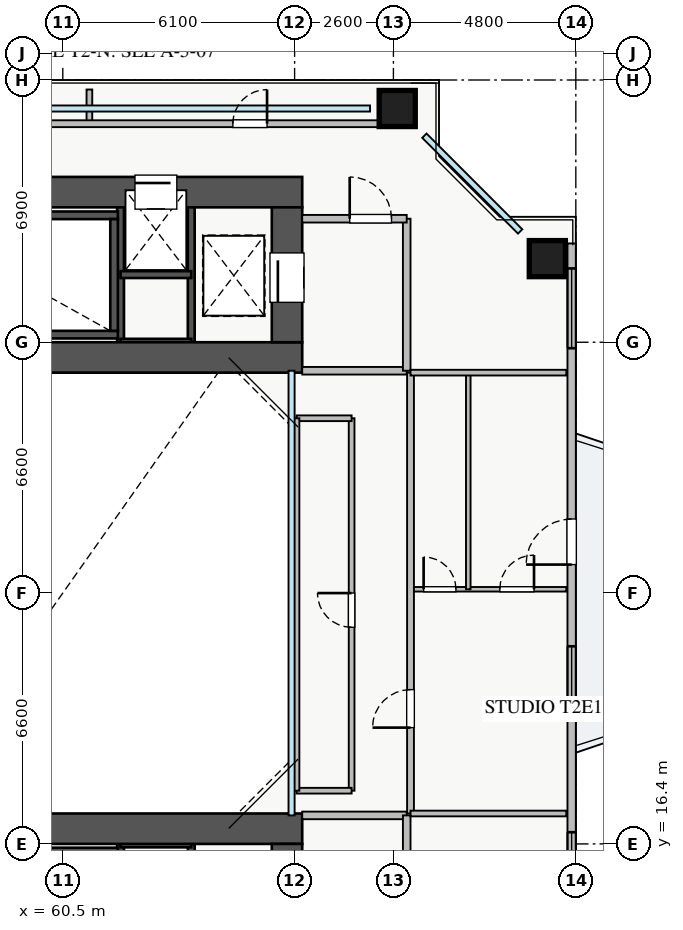
"""IFC4 building model, lengths in metres.
Left out: names, types, materials, properties, quantities, classifications, styles, units other than length and angle.
Written with IfcOpenShell. Run it as: python <this file> out.ifc"""

import sys

from ifc_helpers import new_model, si_unit, direction, frame, frame_2d, origin, origin_2d, place, context, subcontext, project, spatial, rectangle, extrude, source, transform, mapped, element, fill, save


model = new_model("IFC4")
c1 = context("Model", 3, precision=1e-05, world=origin(), true_north=direction((0.0, 1.0)))
c2 = subcontext(c1, "Body", "Model", "MODEL_VIEW")
j1 = project(units=[si_unit("LENGTHUNIT", "METRE"), si_unit("PLANEANGLEUNIT", "RADIAN")], contexts=[c1])
p1 = place(None, origin())
s1 = spatial("IfcSite", under=j1, at=p1, CompositionType="ELEMENT")
p2 = place(p1, origin())
s2 = spatial("IfcBuilding", under=s1, at=p2, CompositionType="ELEMENT")
p3 = place(p2, frame((0.0, 0.0, 36.0)))
s3 = spatial("IfcBuildingStorey", under=s2, at=p3, CompositionType="ELEMENT", Elevation=36.0)
for number, where, z_axis, x_axis in (
    (1, (62.02, 29.6, 0.0), (0.0, 0.0, 1.0), (0.0, 1.0, 0.0)),
    (2, (63.88, 29.6, 0.0), (0.0, 0.0, 1.0), (0.0, 1.0, 0.0)),
):
    element("IfcWall", number, at=place(p3, frame(where, z_axis=z_axis, x_axis=x_axis)), inside=s3, PredefinedType="SHEAR", context=c2, shape_type="SweptSolid", body=[
        extrude(rectangle(XDim=3.95, YDim=0.18, at=frame_2d((1.975, 0.0))), origin(), (0.0, 0.0, 1.0), 3.07),
    ])
for number, where, z_axis, x_axis in (
    (3, (62.02, 31.38, 0.0), (0.0, 0.0, 1.0), (1.0, 0.0, 0.0)),
    (4, (62.02, 29.6, 0.0), (0.0, 0.0, 1.0), (1.0, 0.0, 0.0)),
):
    element("IfcWall", number, at=place(p3, frame(where, z_axis=z_axis, x_axis=x_axis)), inside=s3, PredefinedType="SHEAR", context=c2, shape_type="SweptSolid", body=[
        extrude(rectangle(XDim=1.86, YDim=0.18, at=frame_2d((0.93, 0.0))), origin(), (0.0, 0.0, 1.0), 3.07),
    ])
for number, where, z_axis, x_axis in (
    (5, (62.02, 12.45, 0.0), (0.0, 0.0, 1.0), (0.0, 1.0, 0.0)),
    (6, (63.88, 12.45, 0.0), (0.0, 0.0, 1.0), (0.0, 1.0, 0.0)),
):
    element("IfcWall", number, at=place(p3, frame(where, z_axis=z_axis, x_axis=x_axis)), inside=s3, PredefinedType="SHEAR", context=c2, shape_type="SweptSolid", body=[
        extrude(rectangle(XDim=3.95, YDim=0.18, at=frame_2d((1.975, 0.0))), origin(), (0.0, 0.0, 1.0), 3.07),
    ])
p4 = place(p3, frame((62.02, 16.4, 0.0), z_axis=(0.0, 0.0, 1.0), x_axis=(1.0, 0.0, 0.0)))
e7 = element("IfcWall", 7, at=p4, inside=s3, PredefinedType="SHEAR", context=c2, shape_type="SweptSolid", body=[
    extrude(rectangle(XDim=1.86, YDim=0.18, at=frame_2d((0.93, 0.0))), origin(), (0.0, 0.0, 1.0), 3.07),
])
for number, where, z_axis, x_axis in (
    (8, (54.8, 29.8, 0.0), (0.0, 0.0, 1.0), (1.0, 0.0, 0.0)),
    (9, (54.8, 32.94, 0.0), (0.0, 0.0, 1.0), (1.0, 0.0, 0.0)),
):
    element("IfcWall", number, at=place(p3, frame(where, z_axis=z_axis, x_axis=x_axis)), inside=s3, PredefinedType="SHEAR", context=c2, shape_type="SweptSolid", body=[
        extrude(rectangle(XDim=7.15, YDim=0.2, at=frame_2d((3.575, 0.0))), origin(), (0.0, 0.0, 1.0), 3.25),
    ])
p5 = place(p3, frame((61.85, 29.9, 0.0), z_axis=(0.0, 0.0, 1.0), x_axis=(0.0, 1.0, 0.0)))
e10 = element("IfcWall", 10, at=p5, inside=s3, PredefinedType="SHEAR", context=c2, shape_type="SweptSolid", body=[
    extrude(rectangle(XDim=2.94, YDim=0.2, at=frame_2d((1.47, 0.0))), origin(), (0.0, 0.0, 1.0), 3.25),
])
p6 = place(p3, frame((54.8, 16.2, 0.0), z_axis=(0.0, 0.0, 1.0), x_axis=(1.0, 0.0, 0.0)))
e11 = element("IfcWall", 11, at=p6, inside=s3, PredefinedType="SHEAR", context=c2, shape_type="SweptSolid", body=[
    extrude(rectangle(XDim=7.15, YDim=0.2, at=frame_2d((3.575, 0.0))), origin(), (0.0, 0.0, 1.0), 3.25),
])
p7 = place(p3, frame((54.2, 29.2, 0.0), z_axis=(0.0, 0.0, 1.0), x_axis=(1.0, 0.0, 0.0)))
e12 = element("IfcWall", 12, at=p7, inside=s3, PredefinedType="SHEAR", context=c2, shape_type="SweptSolid", body=[
    extrude(rectangle(XDim=12.6, YDim=0.8, at=frame_2d((6.3, 0.0))), origin(), (0.0, 0.0, 1.0), 3.25),
])
p8 = place(p3, frame((54.2, 33.55, 0.0), z_axis=(0.0, 0.0, 1.0), x_axis=(1.0, 0.0, 0.0)))
e13 = element("IfcWall", 13, at=p8, inside=s3, PredefinedType="SHEAR", context=c2, shape_type="SweptSolid", body=[
    extrude(rectangle(XDim=12.6, YDim=0.8, at=frame_2d((6.3, 0.0))), origin(), (0.0, 0.0, 1.0), 3.25),
])
p9 = place(p8, frame((8.2, 0.0, 0.0)))
e14 = element("IfcOpeningElement", 14, at=p9, cuts=e13, PredefinedType="OPENING", context=c2, shape_type="SweptSolid", body=[
    extrude(rectangle(XDim=1.1, YDim=2.05, at=frame_2d((0.55, 1.025))), frame((0.0, 0.41, 0.0), z_axis=(0.0, -1.0, 0.0), x_axis=(1.0, 0.0, 0.0)), (0.0, 0.0, 1.0), 0.82),
])
p10 = place(p3, frame((66.4, 29.6, 0.0), z_axis=(0.0, 0.0, 1.0), x_axis=(0.0, 1.0, 0.0)))
e15 = element("IfcWall", 15, at=p10, inside=s3, PredefinedType="SHEAR", context=c2, shape_type="SweptSolid", body=[
    extrude(rectangle(XDim=3.55, YDim=0.8, at=frame_2d((1.775, 0.0))), origin(), (0.0, 0.0, 1.0), 3.25),
])
p11 = place(p10, frame((1.05, 0.0, 0.0)))
e16 = element("IfcOpeningElement", 16, at=p11, cuts=e15, PredefinedType="OPENING", context=c2, shape_type="SweptSolid", body=[
    extrude(rectangle(XDim=1.3, YDim=2.05, at=frame_2d((0.65, 1.025))), frame((0.0, 0.41, 0.0), z_axis=(0.0, -1.0, 0.0), x_axis=(1.0, 0.0, 0.0)), (0.0, 0.0, 1.0), 0.82),
])
p12 = place(p3, frame((54.2, 16.8, 0.0), z_axis=(0.0, 0.0, 1.0), x_axis=(1.0, 0.0, 0.0)))
e17 = element("IfcWall", 17, at=p12, inside=s3, PredefinedType="SHEAR", context=c2, shape_type="SweptSolid", body=[
    extrude(rectangle(XDim=12.6, YDim=0.8, at=frame_2d((6.3, 0.0))), origin(), (0.0, 0.0, 1.0), 3.25),
])
p13 = place(p3, frame((66.4, 12.85, 0.0), z_axis=(0.0, 0.0, 1.0), x_axis=(0.0, 1.0, 0.0)))
e18 = element("IfcWall", 18, at=p13, inside=s3, PredefinedType="SHEAR", context=c2, shape_type="SweptSolid", body=[
    extrude(rectangle(XDim=3.55, YDim=0.8, at=frame_2d((1.775, 0.0))), origin(), (0.0, 0.0, 1.0), 3.25),
])
p14 = place(p13, frame((1.05, 0.0, 0.0)))
e19 = element("IfcOpeningElement", 19, at=p14, cuts=e18, PredefinedType="OPENING", context=c2, shape_type="SweptSolid", body=[
    extrude(rectangle(XDim=1.3, YDim=2.05, at=frame_2d((0.65, 1.025))), frame((0.0, 0.41, 0.0), z_axis=(0.0, -1.0, 0.0), x_axis=(1.0, 0.0, 0.0)), (0.0, 0.0, 1.0), 0.82),
])
m1 = source(origin(), c2, "Body", "SweptSolid", [
    extrude(rectangle(XDim=0.95, YDim=0.95, at=origin_2d()), origin(), (0.0, 0.0, 1.0), 3.25),
])
for number, where, z_axis, x_axis in (
    (20, (73.25, 31.8, 0.0), (0.0, 0.0, 1.0), (1.0, 0.0, 0.0)),
    (21, (69.3, 35.75, 0.0), (0.0, 0.0, 1.0), (1.0, 0.0, 0.0)),
):
    element("IfcColumn", number, at=place(p3, frame(where, z_axis=z_axis, x_axis=x_axis)), inside=s3, PredefinedType="COLUMN", context=c2, shape_type="MappedRepresentation", body=[
        mapped(m1, transform((0.0, 0.0, 0.0), x_axis=(1.0, 0.0, 0.0), y_axis=(0.0, 1.0, 0.0), z_axis=(0.0, 0.0, 1.0), scale=1.0)),
    ])
p15 = place(p3, frame((73.89, 13.8, 0.0), z_axis=(0.0, 0.0, 1.0), x_axis=(0.0, 1.0, 0.0)))
e22 = element("IfcWall", 22, at=p15, inside=s3, PredefinedType="STANDARD", context=c2, shape_type="SweptSolid", body=[
    extrude(rectangle(XDim=18.4, YDim=0.22, at=frame_2d((9.2, 0.0))), origin(), (0.0, 0.0, 1.0), 2.61),
])
p16 = place(p15, frame((9.95, 0.0, 0.0)))
e23 = element("IfcOpeningElement", 23, at=p16, cuts=e22, PredefinedType="OPENING", context=c2, shape_type="SweptSolid", body=[
    extrude(rectangle(XDim=1.2, YDim=2.1, at=frame_2d((0.6, 1.05))), frame((0.0, 0.12, 0.0), z_axis=(0.0, -1.0, 0.0), x_axis=(1.0, 0.0, 0.0)), (0.0, 0.0, 1.0), 0.24),
])
p17 = place(p15, frame((0.508, 0.0, 0.9)))
e24 = element("IfcOpeningElement", 24, at=p17, cuts=e22, PredefinedType="OPENING", context=c2, shape_type="SweptSolid", body=[
    extrude(rectangle(XDim=2.4, YDim=1.5, at=frame_2d((1.2, 0.75))), frame((0.0, 0.12, 0.0), z_axis=(0.0, -1.0, 0.0), x_axis=(1.0, 0.0, 0.0)), (0.0, 0.0, 1.0), 0.24),
])
p18 = place(p15, frame((6.0, 0.0, 0.9)))
e25 = element("IfcOpeningElement", 25, at=p18, cuts=e22, PredefinedType="OPENING", context=c2, shape_type="SweptSolid", body=[
    extrude(rectangle(XDim=1.8, YDim=1.45, at=frame_2d((0.9, 0.725))), frame((0.0, 0.12, 0.0), z_axis=(0.0, -1.0, 0.0), x_axis=(1.0, 0.0, 0.0)), (0.0, 0.0, 1.0), 0.24),
])
p19 = place(p15, frame((15.643, 0.0, 0.9)))
e26 = element("IfcOpeningElement", 26, at=p19, cuts=e22, PredefinedType="OPENING", context=c2, shape_type="SweptSolid", body=[
    extrude(rectangle(XDim=2.1, YDim=1.5, at=frame_2d((1.05, 0.75))), frame((0.0, 0.12, 0.0), z_axis=(0.0, -1.0, 0.0), x_axis=(1.0, 0.0, 0.0)), (0.0, 0.0, 1.0), 0.24),
])
p20 = place(p3, frame((66.8, 28.85, 0.0), z_axis=(0.0, 0.0, 1.0), x_axis=(1.0, 0.0, 0.0)))
e27 = element("IfcWall", 27, at=p20, inside=s3, PredefinedType="PARTITIONING", context=c2, shape_type="SweptSolid", body=[
    extrude(rectangle(XDim=2.75, YDim=0.2, at=frame_2d((1.375, 0.0))), origin(), (0.0, 0.0, 1.0), 3.07),
])
p21 = place(p3, frame((69.55, 28.85, 0.0), z_axis=(0.0, 0.0, 1.0), x_axis=(0.0, 1.0, 0.0)))
e28 = element("IfcWall", 28, at=p21, inside=s3, PredefinedType="PARTITIONING", context=c2, shape_type="SweptSolid", body=[
    extrude(rectangle(XDim=4.0, YDim=0.2, at=frame_2d((2.0, 0.0))), origin(), (0.0, 0.0, 1.0), 2.615),
])
p22 = place(p3, frame((66.8, 32.85, 0.0), z_axis=(0.0, 0.0, 1.0), x_axis=(1.0, 0.0, 0.0)))
e29 = element("IfcWall", 29, at=p22, inside=s3, PredefinedType="PARTITIONING", context=c2, shape_type="SweptSolid", body=[
    extrude(rectangle(XDim=2.75, YDim=0.2, at=frame_2d((1.375, 0.0))), origin(), (0.0, 0.0, 1.0), 3.07),
])
p23 = place(p22, frame((1.25, 0.0, 0.0)))
e30 = element("IfcOpeningElement", 30, at=p23, cuts=e29, PredefinedType="OPENING", context=c2, shape_type="SweptSolid", body=[
    extrude(rectangle(XDim=1.1, YDim=2.05, at=frame_2d((0.55, 1.025))), frame((0.0, 0.11, 0.0), z_axis=(0.0, -1.0, 0.0), x_axis=(1.0, 0.0, 0.0)), (0.0, 0.0, 1.0), 0.22),
])
p24 = place(p3, frame((66.8, 17.15, 0.0), z_axis=(0.0, 0.0, 1.0), x_axis=(1.0, 0.0, 0.0)))
e31 = element("IfcWall", 31, at=p24, inside=s3, PredefinedType="PARTITIONING", context=c2, shape_type="SweptSolid", body=[
    extrude(rectangle(XDim=2.75, YDim=0.2, at=frame_2d((1.375, 0.0))), origin(), (0.0, 0.0, 1.0), 3.07),
])
p25 = place(p3, frame((69.55, 13.15, 0.0), z_axis=(0.0, 0.0, 1.0), x_axis=(0.0, 1.0, 0.0)))
e32 = element("IfcWall", 32, at=p25, inside=s3, PredefinedType="PARTITIONING", context=c2, shape_type="SweptSolid", body=[
    extrude(rectangle(XDim=4.0, YDim=0.2, at=frame_2d((2.0, 0.0))), origin(), (0.0, 0.0, 1.0), 2.615),
])
p26 = place(p3, frame((69.65, 23.1, 0.0), z_axis=(0.0, 0.0, 1.0), x_axis=(1.0, 0.0, 0.0)))
e33 = element("IfcWall", 33, at=p26, inside=s3, PredefinedType="PLUMBINGWALL", context=c2, shape_type="SweptSolid", body=[
    extrude(rectangle(XDim=4.1, YDim=0.12, at=frame_2d((2.05, 0.0))), origin(), (0.0, 0.0, 1.0), 2.715),
])
p27 = place(p26, frame((0.345, 0.0, 0.0)))
e34 = element("IfcOpeningElement", 34, at=p27, cuts=e33, PredefinedType="OPENING", context=c2, shape_type="SweptSolid", body=[
    extrude(rectangle(XDim=0.85, YDim=2.05, at=frame_2d((0.425, 1.025))), frame((0.0, 0.07, 0.0), z_axis=(0.0, -1.0, 0.0), x_axis=(1.0, 0.0, 0.0)), (0.0, 0.0, 1.0), 0.14),
])
p28 = place(p26, frame((2.35, 0.0, 0.0)))
e35 = element("IfcOpeningElement", 35, at=p28, cuts=e33, PredefinedType="OPENING", context=c2, shape_type="SweptSolid", body=[
    extrude(rectangle(XDim=0.9, YDim=2.05, at=frame_2d((0.45, 1.025))), frame((0.0, 0.07, 0.0), z_axis=(0.0, -1.0, 0.0), x_axis=(1.0, 0.0, 0.0)), (0.0, 0.0, 1.0), 0.14),
])
p29 = place(p3, frame((71.17, 23.1, 0.0), z_axis=(0.0, 0.0, 1.0), x_axis=(0.0, 1.0, 0.0)))
e36 = element("IfcWall", 36, at=p29, inside=s3, PredefinedType="PLUMBINGWALL", context=c2, shape_type="SweptSolid", body=[
    extrude(rectangle(XDim=5.7, YDim=0.12, at=frame_2d((2.85, 0.0))), origin(), (0.0, 0.0, 1.0), 3.07),
])
p30 = place(p3, frame((69.65, 17.2, 0.0), z_axis=(0.0, 0.0, 1.0), x_axis=(0.0, 1.0, 0.0)))
e37 = element("IfcWall", 37, at=p30, inside=s3, PredefinedType="PARTITIONING", context=c2, shape_type="SweptSolid", body=[
    extrude(rectangle(XDim=11.6, YDim=0.18, at=frame_2d((5.8, 0.0))), origin(), (0.0, 0.0, 1.0), 3.07),
])
p31 = place(p30, frame((2.26, 0.0, 0.0)))
e38 = element("IfcOpeningElement", 38, at=p31, cuts=e37, PredefinedType="OPENING", context=c2, shape_type="SweptSolid", body=[
    extrude(rectangle(XDim=1.0, YDim=2.05, at=frame_2d((0.5, 1.025))), frame((0.0, 0.1, 0.0), z_axis=(0.0, -1.0, 0.0), x_axis=(1.0, 0.0, 0.0)), (0.0, 0.0, 1.0), 0.2),
])
for number, where, z_axis, x_axis in (
    (39, (69.65, 17.2, 0.0), (0.0, 0.0, 1.0), (1.0, 0.0, 0.0)),
    (40, (69.65, 28.8, 0.0), (0.0, 0.0, 1.0), (1.0, 0.0, 0.0)),
):
    element("IfcWall", number, at=place(p3, frame(where, z_axis=z_axis, x_axis=x_axis)), inside=s3, PredefinedType="PARTITIONING", context=c2, shape_type="SweptSolid", body=[
        extrude(rectangle(XDim=4.1, YDim=0.15, at=frame_2d((2.05, 0.0))), origin(), (0.0, 0.0, 1.0), 3.07),
    ])
p32 = place(p3, frame((68.1, 17.8, 0.0), z_axis=(0.0, 0.0, 1.0), x_axis=(0.0, 1.0, 0.0)))
e41 = element("IfcWall", 41, at=p32, inside=s3, PredefinedType="PARTITIONING", context=c2, shape_type="SweptSolid", body=[
    extrude(rectangle(XDim=9.8, YDim=0.15, at=frame_2d((4.9, 0.0))), origin(), (0.0, 0.0, 1.0), 3.07),
])
p33 = place(p32, frame((4.3, 0.0, 0.0)))
e42 = element("IfcOpeningElement", 42, at=p33, cuts=e41, PredefinedType="OPENING", context=c2, shape_type="SweptSolid", body=[
    extrude(rectangle(XDim=0.9, YDim=2.05, at=frame_2d((0.45, 1.025))), frame((0.0, 0.085, 0.0), z_axis=(0.0, -1.0, 0.0), x_axis=(1.0, 0.0, 0.0)), (0.0, 0.0, 1.0), 0.17),
])
p34 = place(p3, frame((66.65, 27.6, 0.0), z_axis=(0.0, 0.0, 1.0), x_axis=(1.0, 0.0, 0.0)))
e43 = element("IfcWall", 43, at=p34, inside=s3, PredefinedType="PARTITIONING", context=c2, shape_type="SweptSolid", body=[
    extrude(rectangle(XDim=1.45, YDim=0.15, at=frame_2d((0.725, 0.0))), origin(), (0.0, 0.0, 1.0), 2.715),
])
p35 = place(p3, frame((66.65, 17.8, 0.0), z_axis=(0.0, 0.0, 1.0), x_axis=(1.0, 0.0, 0.0)))
e44 = element("IfcWall", 44, at=p35, inside=s3, PredefinedType="PARTITIONING", context=c2, shape_type="SweptSolid", body=[
    extrude(rectangle(XDim=1.45, YDim=0.15, at=frame_2d((0.725, 0.0))), origin(), (0.0, 0.0, 1.0), 3.07),
])
p36 = place(p3, frame((66.65, 17.8, 0.0), z_axis=(0.0, 0.0, 1.0), x_axis=(0.0, 1.0, 0.0)))
e45 = element("IfcWall", 45, at=p36, inside=s3, PredefinedType="PARTITIONING", context=c2, shape_type="SweptSolid", body=[
    extrude(rectangle(XDim=9.8, YDim=0.15, at=frame_2d((4.9, 0.0))), origin(), (0.0, 0.0, 1.0), 2.665),
])
for number, where, z_axis, x_axis in (
    (46, (61.2, 35.35, 0.0), (0.0, 0.0, 1.0), (0.0, 1.0, 0.0)),
    (47, (69.65, 35.35, 0.0), (0.0, 0.0, 1.0), (0.0, 1.0, 0.0)),
):
    element("IfcWall", number, at=place(p3, frame(where, z_axis=z_axis, x_axis=x_axis)), inside=s3, PredefinedType="PARTITIONING", context=c2, shape_type="SweptSolid", body=[
        extrude(rectangle(XDim=0.9, YDim=0.15, at=frame_2d((0.45, 0.0))), origin(), (0.0, 0.0, 1.0), 3.07),
    ])
p37 = place(p3, frame((52.65, 35.35, 0.0), z_axis=(0.0, 0.0, 1.0), x_axis=(1.0, 0.0, 0.0)))
e48 = element("IfcWall", 48, at=p37, inside=s3, PredefinedType="PARTITIONING", context=c2, shape_type="SweptSolid", body=[
    extrude(rectangle(XDim=17.0, YDim=0.18, at=frame_2d((8.5, 0.0))), origin(), (0.0, 0.0, 1.0), 3.07),
])
p38 = place(p37, frame((3.825, 0.0, 0.0)))
e49 = element("IfcOpeningElement", 49, at=p38, cuts=e48, PredefinedType="OPENING", context=c2, shape_type="SweptSolid", body=[
    extrude(rectangle(XDim=0.9, YDim=2.05, at=frame_2d((0.45, 1.025))), frame((0.0, 0.1, 0.0), z_axis=(0.0, -1.0, 0.0), x_axis=(1.0, 0.0, 0.0)), (0.0, 0.0, 1.0), 0.2),
])
p39 = place(p37, frame((12.325, 0.0, 0.0)))
e50 = element("IfcOpeningElement", 50, at=p39, cuts=e48, PredefinedType="OPENING", context=c2, shape_type="SweptSolid", body=[
    extrude(rectangle(XDim=0.9, YDim=2.05, at=frame_2d((0.45, 1.025))), frame((0.0, 0.1, 0.0), z_axis=(0.0, -1.0, 0.0), x_axis=(1.0, 0.0, 0.0)), (0.0, 0.0, 1.0), 0.2),
])
m2 = source(origin(), c2, "Body", "SweptSolid", [
    extrude(rectangle(XDim=1.2, YDim=2.1, at=frame_2d((0.6, 1.05))), frame((0.0, 0.025, 0.0), z_axis=(0.0, -1.0, 0.0), x_axis=(1.0, 0.0, 0.0)), (0.0, 0.0, 1.0), 0.05),
])
p40 = place(p16, origin())
e51 = element("IfcDoor", 51, at=p40, inside=s3, OperationType="SINGLE_SWING_LEFT", PredefinedType="DOOR", context=c2, shape_type="MappedRepresentation", body=[
    mapped(m2, transform((0.0, 0.0, 0.0), x_axis=(1.0, 0.0, 0.0), y_axis=(0.0, 1.0, 0.0), z_axis=(0.0, 0.0, 1.0), scale=1.0)),
])
fill(e23, e51)
m3 = source(origin(), c2, "Body", "SweptSolid", [
    extrude(rectangle(XDim=2.4, YDim=1.5, at=frame_2d((1.2, 0.75))), frame((0.0, 0.03, 0.0), z_axis=(0.0, -1.0, 0.0), x_axis=(1.0, 0.0, 0.0)), (0.0, 0.0, 1.0), 0.06),
])
p41 = place(p17, origin())
e52 = element("IfcWindow", 52, at=p41, inside=s3, PartitioningType="TRIPLE_PANEL_VERTICAL", PredefinedType="WINDOW", context=c2, shape_type="MappedRepresentation", body=[
    mapped(m3, transform((0.0, 0.0, 0.0), x_axis=(1.0, 0.0, 0.0), y_axis=(0.0, 1.0, 0.0), z_axis=(0.0, 0.0, 1.0), scale=1.0)),
])
fill(e24, e52)
m4 = source(origin(), c2, "Body", "SweptSolid", [
    extrude(rectangle(XDim=1.8, YDim=1.45, at=frame_2d((0.9, 0.725))), frame((0.0, 0.03, 0.0), z_axis=(0.0, -1.0, 0.0), x_axis=(1.0, 0.0, 0.0)), (0.0, 0.0, 1.0), 0.06),
])
p42 = place(p18, origin())
e53 = element("IfcWindow", 53, at=p42, inside=s3, PartitioningType="DOUBLE_PANEL_VERTICAL", PredefinedType="WINDOW", context=c2, shape_type="MappedRepresentation", body=[
    mapped(m4, transform((0.0, 0.0, 0.0), x_axis=(1.0, 0.0, 0.0), y_axis=(0.0, 1.0, 0.0), z_axis=(0.0, 0.0, 1.0), scale=1.0)),
])
fill(e25, e53)
m5 = source(origin(), c2, "Body", "SweptSolid", [
    extrude(rectangle(XDim=2.1, YDim=1.5, at=frame_2d((1.05, 0.75))), frame((0.0, 0.03, 0.0), z_axis=(0.0, -1.0, 0.0), x_axis=(1.0, 0.0, 0.0)), (0.0, 0.0, 1.0), 0.06),
])
p43 = place(p19, origin())
e54 = element("IfcWindow", 54, at=p43, inside=s3, PartitioningType="TRIPLE_PANEL_VERTICAL", PredefinedType="WINDOW", context=c2, shape_type="MappedRepresentation", body=[
    mapped(m5, transform((0.0, 0.0, 0.0), x_axis=(1.0, 0.0, 0.0), y_axis=(0.0, 1.0, 0.0), z_axis=(0.0, 0.0, 1.0), scale=1.0)),
])
fill(e26, e54)
m6 = source(origin(), c2, "Body", "SweptSolid", [
    extrude(rectangle(XDim=1.3, YDim=2.05, at=frame_2d((0.65, 1.025))), frame((0.0, 0.025, 0.0), z_axis=(0.0, -1.0, 0.0), x_axis=(1.0, 0.0, 0.0)), (0.0, 0.0, 1.0), 0.05),
])
p44 = place(p11, origin())
e55 = element("IfcDoor", 55, at=p44, inside=s3, OperationType="SLIDING_TO_LEFT", PredefinedType="DOOR", context=c2, shape_type="MappedRepresentation", body=[
    mapped(m6, transform((0.0, 0.0, 0.0), x_axis=(1.0, 0.0, 0.0), y_axis=(0.0, 1.0, 0.0), z_axis=(0.0, 0.0, 1.0), scale=1.0)),
])
fill(e16, e55)
m7 = source(origin(), c2, "Body", "SweptSolid", [
    extrude(rectangle(XDim=1.1, YDim=2.05, at=frame_2d((0.55, 1.025))), frame((0.0, 0.025, 0.0), z_axis=(0.0, -1.0, 0.0), x_axis=(1.0, 0.0, 0.0)), (0.0, 0.0, 1.0), 0.05),
])
p45 = place(p9, origin())
e56 = element("IfcDoor", 56, at=p45, inside=s3, OperationType="SLIDING_TO_LEFT", PredefinedType="DOOR", context=c2, shape_type="MappedRepresentation", body=[
    mapped(m7, transform((0.0, 0.0, 0.0), x_axis=(1.0, 0.0, 0.0), y_axis=(0.0, 1.0, 0.0), z_axis=(0.0, 0.0, 1.0), scale=1.0)),
])
fill(e14, e56)
p46 = place(p23, origin())
e57 = element("IfcDoor", 57, at=p46, inside=s3, OperationType="SINGLE_SWING_LEFT", PredefinedType="DOOR", context=c2, shape_type="MappedRepresentation", body=[
    mapped(m7, transform((0.0, 0.0, 0.0), x_axis=(1.0, 0.0, 0.0), y_axis=(0.0, 1.0, 0.0), z_axis=(0.0, 0.0, 1.0), scale=1.0)),
])
fill(e30, e57)
m8 = source(origin(), c2, "Body", "SweptSolid", [
    extrude(rectangle(XDim=0.85, YDim=2.05, at=frame_2d((0.425, 1.025))), frame((0.0, 0.025, 0.0), z_axis=(0.0, -1.0, 0.0), x_axis=(1.0, 0.0, 0.0)), (0.0, 0.0, 1.0), 0.05),
])
p47 = place(p27, origin())
e58 = element("IfcDoor", 58, at=p47, inside=s3, OperationType="SINGLE_SWING_LEFT", PredefinedType="DOOR", context=c2, shape_type="MappedRepresentation", body=[
    mapped(m8, transform((0.0, 0.0, 0.0), x_axis=(1.0, 0.0, 0.0), y_axis=(0.0, 1.0, 0.0), z_axis=(0.0, 0.0, 1.0), scale=1.0)),
])
fill(e34, e58)
m9 = source(origin(), c2, "Body", "SweptSolid", [
    extrude(rectangle(XDim=0.9, YDim=2.05, at=frame_2d((0.45, 1.025))), frame((0.0, 0.025, 0.0), z_axis=(0.0, -1.0, 0.0), x_axis=(1.0, 0.0, 0.0)), (0.0, 0.0, 1.0), 0.05),
])
p48 = place(p28, origin())
e59 = element("IfcDoor", 59, at=p48, inside=s3, OperationType="SINGLE_SWING_RIGHT", PredefinedType="DOOR", context=c2, shape_type="MappedRepresentation", body=[
    mapped(m9, transform((0.0, 0.0, 0.0), x_axis=(1.0, 0.0, 0.0), y_axis=(0.0, 1.0, 0.0), z_axis=(0.0, 0.0, 1.0), scale=1.0)),
])
fill(e35, e59)
m10 = source(origin(), c2, "Body", "SweptSolid", [
    extrude(rectangle(XDim=1.0, YDim=2.05, at=frame_2d((0.5, 1.025))), frame((0.0, 0.025, 0.0), z_axis=(0.0, -1.0, 0.0), x_axis=(1.0, 0.0, 0.0)), (0.0, 0.0, 1.0), 0.05),
])
p49 = place(p31, origin())
e60 = element("IfcDoor", 60, at=p49, inside=s3, OperationType="SINGLE_SWING_LEFT", PredefinedType="DOOR", context=c2, shape_type="MappedRepresentation", body=[
    mapped(m10, transform((0.0, 0.0, 0.0), x_axis=(1.0, 0.0, 0.0), y_axis=(0.0, 1.0, 0.0), z_axis=(0.0, 0.0, 1.0), scale=1.0)),
])
fill(e38, e60)
p50 = place(p33, origin())
e61 = element("IfcDoor", 61, at=p50, inside=s3, OperationType="SINGLE_SWING_RIGHT", PredefinedType="DOOR", context=c2, shape_type="MappedRepresentation", body=[
    mapped(m9, transform((0.0, 0.0, 0.0), x_axis=(1.0, 0.0, 0.0), y_axis=(0.0, 1.0, 0.0), z_axis=(0.0, 0.0, 1.0), scale=1.0)),
])
fill(e42, e61)
p51 = place(p39, origin())
e62 = element("IfcDoor", 62, at=p51, inside=s3, OperationType="SINGLE_SWING_RIGHT", PredefinedType="DOOR", context=c2, shape_type="MappedRepresentation", body=[
    mapped(m9, transform((0.0, 0.0, 0.0), x_axis=(1.0, 0.0, 0.0), y_axis=(0.0, 1.0, 0.0), z_axis=(0.0, 0.0, 1.0), scale=1.0)),
])
fill(e50, e62)
save(model, sys.argv[1])
